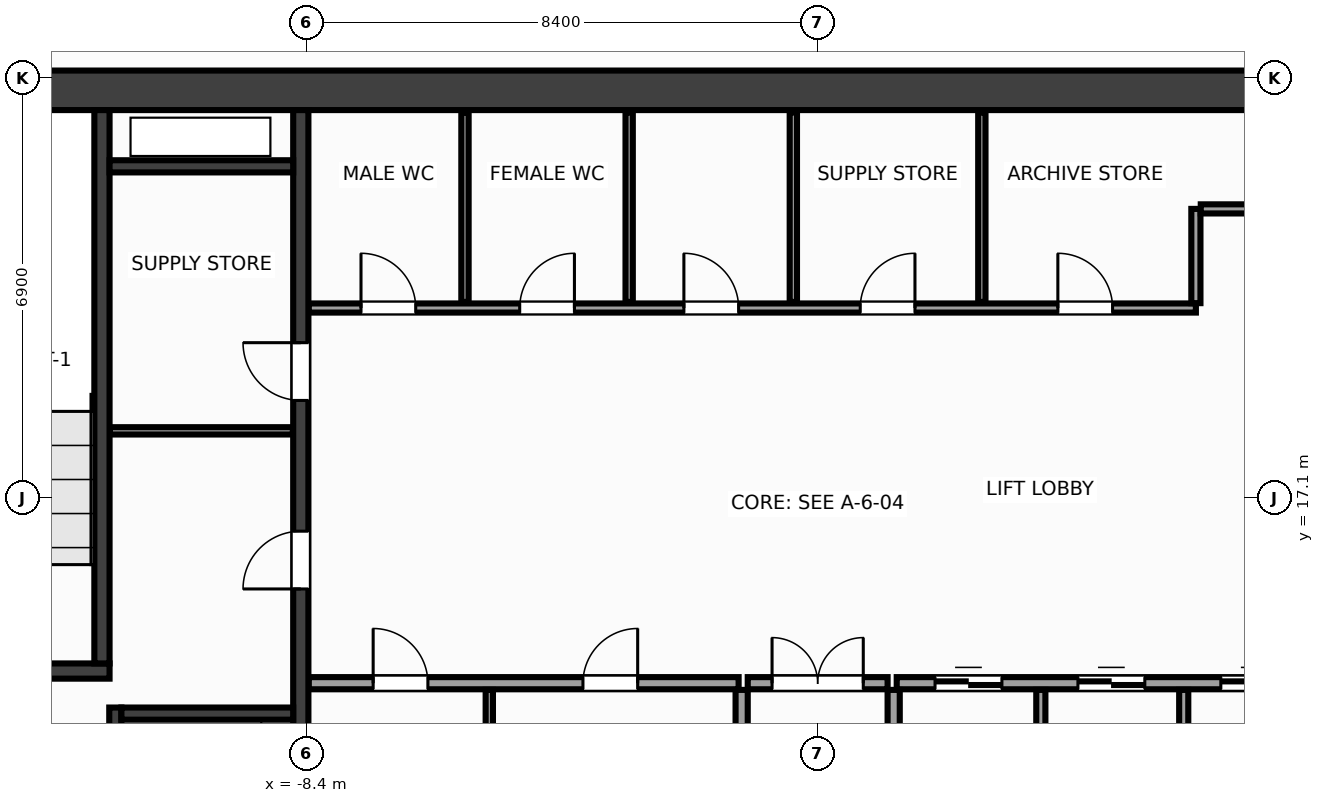
"""IFC4 building model, lengths in metres.
Left out: names, types, materials, properties, quantities, classifications, styles, units other than length and angle.
Written with IfcOpenShell. Run it as: python <this file> out.ifc"""

import sys

from ifc_helpers import new_model, si_unit, direction, frame, frame_2d, origin, place, context, subcontext, project, spatial, rectangle, extrude, source, transform, mapped, element, fill, save


model = new_model("IFC4")
c1 = context("Model", 3, precision=1e-05, world=origin(), true_north=direction((0.0, 1.0)))
c2 = subcontext(c1, "Body", "Model", "MODEL_VIEW")
j1 = project(units=[si_unit("LENGTHUNIT", "METRE"), si_unit("PLANEANGLEUNIT", "RADIAN")], contexts=[c1])
p1 = place(None, origin())
s1 = spatial("IfcSite", under=j1, at=p1, CompositionType="ELEMENT")
p2 = place(p1, origin())
s2 = spatial("IfcBuilding", under=s1, at=p2, CompositionType="ELEMENT")
p3 = place(p2, frame((0.0, 0.0, 99.2)))
s3 = spatial("IfcBuildingStorey", under=s2, at=p3, CompositionType="ELEMENT", Elevation=99.2)
m1 = source(origin(), c2, "Body", "SweptSolid", [
    extrude(rectangle(XDim=31.85, YDim=0.65, at=frame_2d((15.925, 0.0))), origin(), (0.0, 0.0, 1.0), 3.6),
])
p4 = place(p3, frame((-15.925, 23.8, 0.0), z_axis=(0.0, 0.0, 1.0), x_axis=(1.0, 0.0, 0.0)))
e1 = element("IfcWall", 1, at=p4, inside=s3, PredefinedType="SHEAR", context=c2, shape_type="MappedRepresentation", body=[
    mapped(m1, transform((0.0, 0.0, 0.0), x_axis=(1.0, 0.0, 0.0), y_axis=(0.0, 1.0, 0.0), z_axis=(0.0, 0.0, 1.0), scale=1.0)),
])
m2 = source(origin(), c2, "Body", "SweptSolid", [
    extrude(rectangle(XDim=12.95, YDim=0.25, at=frame_2d((6.475, 0.0))), origin(), (0.0, 0.0, 1.0), 3.6),
])
p5 = place(p3, frame((-8.5, 10.525, 0.0), z_axis=(0.0, 0.0, 1.0), x_axis=(0.0, 1.0, 0.0)))
e2 = element("IfcWall", 2, at=p5, inside=s3, PredefinedType="SHEAR", context=c2, shape_type="MappedRepresentation", body=[
    mapped(m2, transform((0.0, 0.0, 0.0), x_axis=(1.0, 0.0, 0.0), y_axis=(0.0, 1.0, 0.0), z_axis=(0.0, 0.0, 1.0), scale=1.0)),
])
p6 = place(p5, frame((5.075, 0.0, 0.0)))
e3 = element("IfcOpeningElement", 3, at=p6, cuts=e2, PredefinedType="OPENING", context=c2, shape_type="SweptSolid", body=[
    extrude(rectangle(XDim=0.95, YDim=2.15, at=frame_2d((0.475, 1.075))), frame((0.0, 0.137, 0.0), z_axis=(0.0, -1.0, 0.0), x_axis=(1.0, 0.0, 0.0)), (0.0, 0.0, 1.0), 0.274),
])
p7 = place(p5, frame((8.175, 0.0, 0.0)))
e4 = element("IfcOpeningElement", 4, at=p7, cuts=e2, PredefinedType="OPENING", context=c2, shape_type="SweptSolid", body=[
    extrude(rectangle(XDim=0.95, YDim=2.15, at=frame_2d((0.475, 1.075))), frame((0.0, 0.137, 0.0), z_axis=(0.0, -1.0, 0.0), x_axis=(1.0, 0.0, 0.0)), (0.0, 0.0, 1.0), 0.274),
])
m3 = source(origin(), c2, "Body", "SweptSolid", [
    extrude(rectangle(XDim=3.63, YDim=0.25, at=frame_2d((1.815, 0.0))), origin(), (0.0, 0.0, 1.0), 3.6),
])
p8 = place(p3, frame((-15.275, 14.25, 0.0), z_axis=(0.0, 0.0, 1.0), x_axis=(1.0, 0.0, 0.0)))
e5 = element("IfcWall", 5, at=p8, inside=s3, PredefinedType="SHEAR", context=c2, shape_type="MappedRepresentation", body=[
    mapped(m3, transform((0.0, 0.0, 0.0), x_axis=(1.0, 0.0, 0.0), y_axis=(0.0, 1.0, 0.0), z_axis=(0.0, 0.0, 1.0), scale=1.0)),
])
p9 = place(p8, frame((0.95, 0.0, 0.0)))
e6 = element("IfcOpeningElement", 6, at=p9, cuts=e5, PredefinedType="OPENING", context=c2, shape_type="SweptSolid", body=[
    extrude(rectangle(XDim=1.6, YDim=2.15, at=frame_2d((0.8, 1.075))), frame((0.0, 0.137, 0.0), z_axis=(0.0, -1.0, 0.0), x_axis=(1.0, 0.0, 0.0)), (0.0, 0.0, 1.0), 0.274),
])
m4 = source(origin(), c2, "Body", "SweptSolid", [
    extrude(rectangle(XDim=9.1, YDim=0.25, at=frame_2d((4.55, 0.0))), origin(), (0.0, 0.0, 1.0), 3.6),
])
p10 = place(p3, frame((-11.77, 14.375, 0.0), z_axis=(0.0, 0.0, 1.0), x_axis=(0.0, 1.0, 0.0)))
e7 = element("IfcWall", 7, at=p10, inside=s3, PredefinedType="SHEAR", context=c2, shape_type="MappedRepresentation", body=[
    mapped(m4, transform((0.0, 0.0, 0.0), x_axis=(1.0, 0.0, 0.0), y_axis=(0.0, 1.0, 0.0), z_axis=(0.0, 0.0, 1.0), scale=1.0)),
])
m5 = source(origin(), c2, "Body", "SweptSolid", [
    extrude(rectangle(XDim=3.125, YDim=0.2, at=frame_2d((1.562, 0.0))), origin(), (0.0, 0.0, 1.0), 3.6),
])
p11 = place(p3, frame((-11.55, 10.525, 0.0), z_axis=(0.0, 0.0, 1.0), x_axis=(0.0, 1.0, 0.0)))
e8 = element("IfcWall", 8, at=p11, inside=s3, PredefinedType="SHEAR", context=c2, shape_type="MappedRepresentation", body=[
    mapped(m5, transform((0.0, 0.0, 0.0), x_axis=(1.0, 0.0, 0.0), y_axis=(0.0, 1.0, 0.0), z_axis=(0.0, 0.0, 1.0), scale=1.0)),
])
p12 = place(p11, frame((0.9, 0.0, 0.0)))
e9 = element("IfcOpeningElement", 9, at=p12, cuts=e8, PredefinedType="OPENING", context=c2, shape_type="SweptSolid", body=[
    extrude(rectangle(XDim=1.1, YDim=2.15, at=frame_2d((0.55, 1.075))), frame((0.0, 0.112, 0.0), z_axis=(0.0, -1.0, 0.0), x_axis=(1.0, 0.0, 0.0)), (0.0, 0.0, 1.0), 0.224),
])
m6 = source(origin(), c2, "Body", "SweptSolid", [
    extrude(rectangle(XDim=2.825, YDim=0.2, at=frame_2d((1.413, 0.0))), origin(), (0.0, 0.0, 1.0), 3.6),
])
p13 = place(p3, frame((-11.45, 13.55, 0.0), z_axis=(0.0, 0.0, 1.0), x_axis=(1.0, 0.0, 0.0)))
e10 = element("IfcWall", 10, at=p13, inside=s3, PredefinedType="SHEAR", context=c2, shape_type="MappedRepresentation", body=[
    mapped(m6, transform((0.0, 0.0, 0.0), x_axis=(1.0, 0.0, 0.0), y_axis=(0.0, 1.0, 0.0), z_axis=(0.0, 0.0, 1.0), scale=1.0)),
])
m7 = source(origin(), c2, "Body", "SweptSolid", [
    extrude(rectangle(XDim=3.02, YDim=0.2, at=frame_2d((1.51, 0.0))), origin(), (0.0, 0.0, 1.0), 3.6),
])
p14 = place(p3, frame((-11.645, 22.55, 0.0), z_axis=(0.0, 0.0, 1.0), x_axis=(1.0, 0.0, 0.0)))
e11 = element("IfcWall", 11, at=p14, inside=s3, PredefinedType="SHEAR", context=c2, shape_type="MappedRepresentation", body=[
    mapped(m7, transform((0.0, 0.0, 0.0), x_axis=(1.0, 0.0, 0.0), y_axis=(0.0, 1.0, 0.0), z_axis=(0.0, 0.0, 1.0), scale=1.0)),
])
m8 = source(origin(), c2, "Body", "SweptSolid", [
    extrude(rectangle(XDim=3.01, YDim=0.12, at=frame_2d((1.505, 0.0))), origin(), (0.0, 0.0, 1.0), 3.36),
])
p15 = place(p3, frame((-11.64, 18.2, 0.0), z_axis=(0.0, 0.0, 1.0), x_axis=(1.0, 0.0, 0.0)))
e12 = element("IfcWall", 12, at=p15, inside=s3, PredefinedType="PARTITIONING", context=c2, shape_type="MappedRepresentation", body=[
    mapped(m8, transform((0.0, 0.0, 0.0), x_axis=(1.0, 0.0, 0.0), y_axis=(0.0, 1.0, 0.0), z_axis=(0.0, 0.0, 1.0), scale=1.0)),
])
m9 = source(origin(), c2, "Body", "SweptSolid", [
    extrude(rectangle(XDim=7.07, YDim=0.2, at=frame_2d((3.535, 0.0))), origin(), (0.0, 0.0, 1.0), 3.36),
])
p16 = place(p3, frame((-8.37, 14.05, 0.0), z_axis=(0.0, 0.0, 1.0), x_axis=(1.0, 0.0, 0.0)))
e13 = element("IfcWall", 13, at=p16, inside=s3, PredefinedType="PARTITIONING", context=c2, shape_type="MappedRepresentation", body=[
    mapped(m9, transform((0.0, 0.0, 0.0), x_axis=(1.0, 0.0, 0.0), y_axis=(0.0, 1.0, 0.0), z_axis=(0.0, 0.0, 1.0), scale=1.0)),
])
p17 = place(p16, frame((1.06, 0.0, 0.0)))
e14 = element("IfcOpeningElement", 14, at=p17, cuts=e13, PredefinedType="OPENING", context=c2, shape_type="SweptSolid", body=[
    extrude(rectangle(XDim=0.9, YDim=2.15, at=frame_2d((0.45, 1.075))), frame((0.0, 0.112, 0.0), z_axis=(0.0, -1.0, 0.0), x_axis=(1.0, 0.0, 0.0)), (0.0, 0.0, 1.0), 0.224),
])
p18 = place(p16, frame((4.51, 0.0, 0.0)))
e15 = element("IfcOpeningElement", 15, at=p18, cuts=e13, PredefinedType="OPENING", context=c2, shape_type="SweptSolid", body=[
    extrude(rectangle(XDim=0.9, YDim=2.15, at=frame_2d((0.45, 1.075))), frame((0.0, 0.112, 0.0), z_axis=(0.0, -1.0, 0.0), x_axis=(1.0, 0.0, 0.0)), (0.0, 0.0, 1.0), 0.224),
])
p19 = place(p3, frame((1.3, 14.05, 0.0), z_axis=(0.0, 0.0, 1.0), x_axis=(1.0, 0.0, 0.0)))
e16 = element("IfcWall", 16, at=p19, inside=s3, PredefinedType="PARTITIONING", context=c2, shape_type="MappedRepresentation", body=[
    mapped(m9, transform((0.0, 0.0, 0.0), x_axis=(1.0, 0.0, 0.0), y_axis=(0.0, 1.0, 0.0), z_axis=(0.0, 0.0, 1.0), scale=1.0)),
])
p20 = place(p19, frame((0.63, 0.0, 0.0)))
e17 = element("IfcOpeningElement", 17, at=p20, cuts=e16, PredefinedType="OPENING", context=c2, shape_type="SweptSolid", body=[
    extrude(rectangle(XDim=1.1, YDim=2.15, at=frame_2d((0.55, 1.075))), frame((0.0, 0.112, 0.0), z_axis=(0.0, -1.0, 0.0), x_axis=(1.0, 0.0, 0.0)), (0.0, 0.0, 1.0), 0.224),
])
p21 = place(p19, frame((2.98, 0.0, 0.0)))
e18 = element("IfcOpeningElement", 18, at=p21, cuts=e16, PredefinedType="OPENING", context=c2, shape_type="SweptSolid", body=[
    extrude(rectangle(XDim=1.1, YDim=2.15, at=frame_2d((0.55, 1.075))), frame((0.0, 0.112, 0.0), z_axis=(0.0, -1.0, 0.0), x_axis=(1.0, 0.0, 0.0)), (0.0, 0.0, 1.0), 0.224),
])
p22 = place(p19, frame((5.33, 0.0, 0.0)))
e19 = element("IfcOpeningElement", 19, at=p22, cuts=e16, PredefinedType="OPENING", context=c2, shape_type="SweptSolid", body=[
    extrude(rectangle(XDim=1.1, YDim=2.15, at=frame_2d((0.55, 1.075))), frame((0.0, 0.112, 0.0), z_axis=(0.0, -1.0, 0.0), x_axis=(1.0, 0.0, 0.0)), (0.0, 0.0, 1.0), 0.224),
])
m10 = source(origin(), c2, "Body", "SweptSolid", [
    extrude(rectangle(XDim=3.415, YDim=0.2, at=frame_2d((1.708, 0.0))), origin(), (0.0, 0.0, 1.0), 3.36),
])
for number, where, z_axis, x_axis in (
    (20, (-1.25, 10.525, 0.0), (0.0, 0.0, 1.0), (0.0, 1.0, 0.0)),
    (21, (1.25, 10.525, 0.0), (0.0, 0.0, 1.0), (0.0, 1.0, 0.0)),
):
    element("IfcWall", number, at=place(p3, frame(where, z_axis=z_axis, x_axis=x_axis)), inside=s3, PredefinedType="PARTITIONING", context=c2, shape_type="MappedRepresentation", body=[
        mapped(m10, transform((0.0, 0.0, 0.0), x_axis=(1.0, 0.0, 0.0), y_axis=(0.0, 1.0, 0.0), z_axis=(0.0, 0.0, 1.0), scale=1.0)),
    ])
m11 = source(origin(), c2, "Body", "SweptSolid", [
    extrude(rectangle(XDim=2.3, YDim=0.2, at=frame_2d((1.15, 0.0))), origin(), (0.0, 0.0, 1.0), 3.36),
])
p23 = place(p3, frame((-1.15, 14.05, 0.0), z_axis=(0.0, 0.0, 1.0), x_axis=(1.0, 0.0, 0.0)))
e22 = element("IfcWall", 22, at=p23, inside=s3, PredefinedType="PARTITIONING", context=c2, shape_type="MappedRepresentation", body=[
    mapped(m11, transform((0.0, 0.0, 0.0), x_axis=(1.0, 0.0, 0.0), y_axis=(0.0, 1.0, 0.0), z_axis=(0.0, 0.0, 1.0), scale=1.0)),
])
p24 = place(p23, frame((0.4, 0.0, 0.0)))
e23 = element("IfcOpeningElement", 23, at=p24, cuts=e22, PredefinedType="OPENING", context=c2, shape_type="SweptSolid", body=[
    extrude(rectangle(XDim=1.5, YDim=2.2, at=frame_2d((0.75, 1.1))), frame((0.0, 0.112, 0.0), z_axis=(0.0, -1.0, 0.0), x_axis=(1.0, 0.0, 0.0)), (0.0, 0.0, 1.0), 0.224),
])
m12 = source(origin(), c2, "Body", "SweptSolid", [
    extrude(rectangle(XDim=14.59, YDim=0.15, at=frame_2d((7.295, 0.0))), origin(), (0.0, 0.0, 1.0), 3.36),
])
p25 = place(p3, frame((-8.37, 20.22, 0.0), z_axis=(0.0, 0.0, 1.0), x_axis=(1.0, 0.0, 0.0)))
e24 = element("IfcWall", 24, at=p25, inside=s3, PredefinedType="PARTITIONING", context=c2, shape_type="MappedRepresentation", body=[
    mapped(m12, transform((0.0, 0.0, 0.0), x_axis=(1.0, 0.0, 0.0), y_axis=(0.0, 1.0, 0.0), z_axis=(0.0, 0.0, 1.0), scale=1.0)),
])
p26 = place(p25, frame((0.86, 0.0, 0.0)))
e25 = element("IfcOpeningElement", 25, at=p26, cuts=e24, PredefinedType="OPENING", context=c2, shape_type="SweptSolid", body=[
    extrude(rectangle(XDim=0.9, YDim=2.15, at=frame_2d((0.45, 1.075))), frame((0.0, 0.087, 0.0), z_axis=(0.0, -1.0, 0.0), x_axis=(1.0, 0.0, 0.0)), (0.0, 0.0, 1.0), 0.174),
])
p27 = place(p25, frame((3.47, 0.0, 0.0)))
e26 = element("IfcOpeningElement", 26, at=p27, cuts=e24, PredefinedType="OPENING", context=c2, shape_type="SweptSolid", body=[
    extrude(rectangle(XDim=0.9, YDim=2.15, at=frame_2d((0.45, 1.075))), frame((0.0, 0.087, 0.0), z_axis=(0.0, -1.0, 0.0), x_axis=(1.0, 0.0, 0.0)), (0.0, 0.0, 1.0), 0.174),
])
p28 = place(p25, frame((6.17, 0.0, 0.0)))
e27 = element("IfcOpeningElement", 27, at=p28, cuts=e24, PredefinedType="OPENING", context=c2, shape_type="SweptSolid", body=[
    extrude(rectangle(XDim=0.9, YDim=2.15, at=frame_2d((0.45, 1.075))), frame((0.0, 0.087, 0.0), z_axis=(0.0, -1.0, 0.0), x_axis=(1.0, 0.0, 0.0)), (0.0, 0.0, 1.0), 0.174),
])
p29 = place(p25, frame((9.07, 0.0, 0.0)))
e28 = element("IfcOpeningElement", 28, at=p29, cuts=e24, PredefinedType="OPENING", context=c2, shape_type="SweptSolid", body=[
    extrude(rectangle(XDim=0.9, YDim=2.15, at=frame_2d((0.45, 1.075))), frame((0.0, 0.087, 0.0), z_axis=(0.0, -1.0, 0.0), x_axis=(1.0, 0.0, 0.0)), (0.0, 0.0, 1.0), 0.174),
])
p30 = place(p25, frame((12.32, 0.0, 0.0)))
e29 = element("IfcOpeningElement", 29, at=p30, cuts=e24, PredefinedType="OPENING", context=c2, shape_type="SweptSolid", body=[
    extrude(rectangle(XDim=0.9, YDim=2.15, at=frame_2d((0.45, 1.075))), frame((0.0, 0.087, 0.0), z_axis=(0.0, -1.0, 0.0), x_axis=(1.0, 0.0, 0.0)), (0.0, 0.0, 1.0), 0.174),
])
m13 = source(origin(), c2, "Body", "SweptSolid", [
    extrude(rectangle(XDim=1.55, YDim=0.15, at=frame_2d((0.775, 0.0))), origin(), (0.0, 0.0, 1.0), 3.36),
])
p31 = place(p3, frame((6.22, 20.3, 0.0), z_axis=(0.0, 0.0, 1.0), x_axis=(0.0, 1.0, 0.0)))
e30 = element("IfcWall", 30, at=p31, inside=s3, PredefinedType="PARTITIONING", context=c2, shape_type="MappedRepresentation", body=[
    mapped(m13, transform((0.0, 0.0, 0.0), x_axis=(1.0, 0.0, 0.0), y_axis=(0.0, 1.0, 0.0), z_axis=(0.0, 0.0, 1.0), scale=1.0)),
])
m14 = source(origin(), c2, "Body", "SweptSolid", [
    extrude(rectangle(XDim=2.07, YDim=0.15, at=frame_2d((1.035, 0.0))), origin(), (0.0, 0.0, 1.0), 3.36),
])
p32 = place(p3, frame((6.3, 21.85, 0.0), z_axis=(0.0, 0.0, 1.0), x_axis=(1.0, 0.0, 0.0)))
e31 = element("IfcWall", 31, at=p32, inside=s3, PredefinedType="PARTITIONING", context=c2, shape_type="MappedRepresentation", body=[
    mapped(m14, transform((0.0, 0.0, 0.0), x_axis=(1.0, 0.0, 0.0), y_axis=(0.0, 1.0, 0.0), z_axis=(0.0, 0.0, 1.0), scale=1.0)),
])
m15 = source(origin(), c2, "Body", "SweptSolid", [
    extrude(rectangle(XDim=3.415, YDim=0.12, at=frame_2d((1.708, 0.0))), origin(), (0.0, 0.0, 1.0), 3.36),
])
p33 = place(p3, frame((-5.4, 10.525, 0.0), z_axis=(0.0, 0.0, 1.0), x_axis=(0.0, 1.0, 0.0)))
e32 = element("IfcWall", 32, at=p33, inside=s3, PredefinedType="PARTITIONING", context=c2, shape_type="MappedRepresentation", body=[
    mapped(m15, transform((0.0, 0.0, 0.0), x_axis=(1.0, 0.0, 0.0), y_axis=(0.0, 1.0, 0.0), z_axis=(0.0, 0.0, 1.0), scale=1.0)),
])
m16 = source(origin(), c2, "Body", "SweptSolid", [
    extrude(rectangle(XDim=3.415, YDim=0.15, at=frame_2d((1.708, 0.0))), origin(), (0.0, 0.0, 1.0), 3.36),
])
for number, where, z_axis, x_axis in (
    (33, (3.67, 10.525, 0.0), (0.0, 0.0, 1.0), (0.0, 1.0, 0.0)),
    (34, (6.02, 10.525, 0.0), (0.0, 0.0, 1.0), (0.0, 1.0, 0.0)),
):
    element("IfcWall", number, at=place(p3, frame(where, z_axis=z_axis, x_axis=x_axis)), inside=s3, PredefinedType="PARTITIONING", context=c2, shape_type="MappedRepresentation", body=[
        mapped(m16, transform((0.0, 0.0, 0.0), x_axis=(1.0, 0.0, 0.0), y_axis=(0.0, 1.0, 0.0), z_axis=(0.0, 0.0, 1.0), scale=1.0)),
    ])
m17 = source(origin(), c2, "Body", "SweptSolid", [
    extrude(rectangle(XDim=3.115, YDim=0.12, at=frame_2d((1.558, 0.0))), origin(), (0.0, 0.0, 1.0), 3.36),
])
for number, where, z_axis, x_axis in (
    (35, (-5.8, 20.32, 0.0), (0.0, 0.0, 1.0), (0.0, 1.0, 0.0)),
    (36, (-3.1, 20.32, 0.0), (0.0, 0.0, 1.0), (0.0, 1.0, 0.0)),
    (37, (-0.4, 20.32, 0.0), (0.0, 0.0, 1.0), (0.0, 1.0, 0.0)),
    (38, (2.7, 20.32, 0.0), (0.0, 0.0, 1.0), (0.0, 1.0, 0.0)),
):
    element("IfcWall", number, at=place(p3, frame(where, z_axis=z_axis, x_axis=x_axis)), inside=s3, PredefinedType="PARTITIONING", context=c2, shape_type="MappedRepresentation", body=[
        mapped(m17, transform((0.0, 0.0, 0.0), x_axis=(1.0, 0.0, 0.0), y_axis=(0.0, 1.0, 0.0), z_axis=(0.0, 0.0, 1.0), scale=1.0)),
    ])
m18 = source(origin(), c2, "Body", "SweptSolid", [
    extrude(rectangle(XDim=0.95, YDim=2.15, at=frame_2d((0.475, 1.075))), frame((0.0, 0.025, 0.0), z_axis=(0.0, -1.0, 0.0), x_axis=(1.0, 0.0, 0.0)), (0.0, 0.0, 1.0), 0.05),
])
p34 = place(p6, origin())
e39 = element("IfcDoor", 39, at=p34, inside=s3, OperationType="SINGLE_SWING_LEFT", PredefinedType="DOOR", context=c2, shape_type="MappedRepresentation", body=[
    mapped(m18, transform((0.0, 0.0, 0.0), x_axis=(1.0, 0.0, 0.0), y_axis=(0.0, 1.0, 0.0), z_axis=(0.0, 0.0, 1.0), scale=1.0)),
])
fill(e3, e39)
p35 = place(p7, origin())
e40 = element("IfcDoor", 40, at=p35, inside=s3, OperationType="SINGLE_SWING_RIGHT", PredefinedType="DOOR", context=c2, shape_type="MappedRepresentation", body=[
    mapped(m18, transform((0.0, 0.0, 0.0), x_axis=(1.0, 0.0, 0.0), y_axis=(0.0, 1.0, 0.0), z_axis=(0.0, 0.0, 1.0), scale=1.0)),
])
fill(e4, e40)
m19 = source(origin(), c2, "Body", "SweptSolid", [
    extrude(rectangle(XDim=0.9, YDim=2.15, at=frame_2d((0.45, 1.075))), frame((0.0, 0.025, 0.0), z_axis=(0.0, -1.0, 0.0), x_axis=(1.0, 0.0, 0.0)), (0.0, 0.0, 1.0), 0.05),
])
p36 = place(p17, origin())
e41 = element("IfcDoor", 41, at=p36, inside=s3, OperationType="SINGLE_SWING_LEFT", PredefinedType="DOOR", context=c2, shape_type="MappedRepresentation", body=[
    mapped(m19, transform((0.0, 0.0, 0.0), x_axis=(1.0, 0.0, 0.0), y_axis=(0.0, 1.0, 0.0), z_axis=(0.0, 0.0, 1.0), scale=1.0)),
])
fill(e14, e41)
p37 = place(p18, origin())
e42 = element("IfcDoor", 42, at=p37, inside=s3, OperationType="SINGLE_SWING_RIGHT", PredefinedType="DOOR", context=c2, shape_type="MappedRepresentation", body=[
    mapped(m19, transform((0.0, 0.0, 0.0), x_axis=(1.0, 0.0, 0.0), y_axis=(0.0, 1.0, 0.0), z_axis=(0.0, 0.0, 1.0), scale=1.0)),
])
fill(e15, e42)
m20 = source(origin(), c2, "Body", "SweptSolid", [
    extrude(rectangle(XDim=1.1, YDim=2.15, at=frame_2d((0.55, 1.075))), frame((0.0, 0.025, 0.0), z_axis=(0.0, -1.0, 0.0), x_axis=(1.0, 0.0, 0.0)), (0.0, 0.0, 1.0), 0.05),
])
p38 = place(p20, origin())
e43 = element("IfcDoor", 43, at=p38, inside=s3, OperationType="DOUBLE_DOOR_SLIDING", PredefinedType="DOOR", context=c2, shape_type="MappedRepresentation", body=[
    mapped(m20, transform((0.0, 0.0, 0.0), x_axis=(1.0, 0.0, 0.0), y_axis=(0.0, 1.0, 0.0), z_axis=(0.0, 0.0, 1.0), scale=1.0)),
])
fill(e17, e43)
p39 = place(p21, origin())
e44 = element("IfcDoor", 44, at=p39, inside=s3, OperationType="DOUBLE_DOOR_SLIDING", PredefinedType="DOOR", context=c2, shape_type="MappedRepresentation", body=[
    mapped(m20, transform((0.0, 0.0, 0.0), x_axis=(1.0, 0.0, 0.0), y_axis=(0.0, 1.0, 0.0), z_axis=(0.0, 0.0, 1.0), scale=1.0)),
])
fill(e18, e44)
p40 = place(p22, origin())
e45 = element("IfcDoor", 45, at=p40, inside=s3, OperationType="DOUBLE_DOOR_SLIDING", PredefinedType="DOOR", context=c2, shape_type="MappedRepresentation", body=[
    mapped(m20, transform((0.0, 0.0, 0.0), x_axis=(1.0, 0.0, 0.0), y_axis=(0.0, 1.0, 0.0), z_axis=(0.0, 0.0, 1.0), scale=1.0)),
])
fill(e19, e45)
m21 = source(origin(), c2, "Body", "SweptSolid", [
    extrude(rectangle(XDim=1.5, YDim=2.2, at=frame_2d((0.75, 1.1))), frame((0.0, 0.025, 0.0), z_axis=(0.0, -1.0, 0.0), x_axis=(1.0, 0.0, 0.0)), (0.0, 0.0, 1.0), 0.05),
])
p41 = place(p24, origin())
e46 = element("IfcDoor", 46, at=p41, inside=s3, OperationType="DOUBLE_DOOR_SINGLE_SWING", PredefinedType="DOOR", context=c2, shape_type="MappedRepresentation", body=[
    mapped(m21, transform((0.0, 0.0, 0.0), x_axis=(1.0, 0.0, 0.0), y_axis=(0.0, 1.0, 0.0), z_axis=(0.0, 0.0, 1.0), scale=1.0)),
])
fill(e23, e46)
p42 = place(p26, origin())
e47 = element("IfcDoor", 47, at=p42, inside=s3, OperationType="SINGLE_SWING_LEFT", PredefinedType="DOOR", context=c2, shape_type="MappedRepresentation", body=[
    mapped(m19, transform((0.0, 0.0, 0.0), x_axis=(1.0, 0.0, 0.0), y_axis=(0.0, 1.0, 0.0), z_axis=(0.0, 0.0, 1.0), scale=1.0)),
])
fill(e25, e47)
p43 = place(p27, origin())
e48 = element("IfcDoor", 48, at=p43, inside=s3, OperationType="SINGLE_SWING_RIGHT", PredefinedType="DOOR", context=c2, shape_type="MappedRepresentation", body=[
    mapped(m19, transform((0.0, 0.0, 0.0), x_axis=(1.0, 0.0, 0.0), y_axis=(0.0, 1.0, 0.0), z_axis=(0.0, 0.0, 1.0), scale=1.0)),
])
fill(e26, e48)
p44 = place(p28, origin())
e49 = element("IfcDoor", 49, at=p44, inside=s3, OperationType="SINGLE_SWING_LEFT", PredefinedType="DOOR", context=c2, shape_type="MappedRepresentation", body=[
    mapped(m19, transform((0.0, 0.0, 0.0), x_axis=(1.0, 0.0, 0.0), y_axis=(0.0, 1.0, 0.0), z_axis=(0.0, 0.0, 1.0), scale=1.0)),
])
fill(e27, e49)
p45 = place(p29, origin())
e50 = element("IfcDoor", 50, at=p45, inside=s3, OperationType="SINGLE_SWING_RIGHT", PredefinedType="DOOR", context=c2, shape_type="MappedRepresentation", body=[
    mapped(m19, transform((0.0, 0.0, 0.0), x_axis=(1.0, 0.0, 0.0), y_axis=(0.0, 1.0, 0.0), z_axis=(0.0, 0.0, 1.0), scale=1.0)),
])
fill(e28, e50)
p46 = place(p30, origin())
e51 = element("IfcDoor", 51, at=p46, inside=s3, OperationType="SINGLE_SWING_LEFT", PredefinedType="DOOR", context=c2, shape_type="MappedRepresentation", body=[
    mapped(m19, transform((0.0, 0.0, 0.0), x_axis=(1.0, 0.0, 0.0), y_axis=(0.0, 1.0, 0.0), z_axis=(0.0, 0.0, 1.0), scale=1.0)),
])
fill(e29, e51)
save(model, sys.argv[1])
